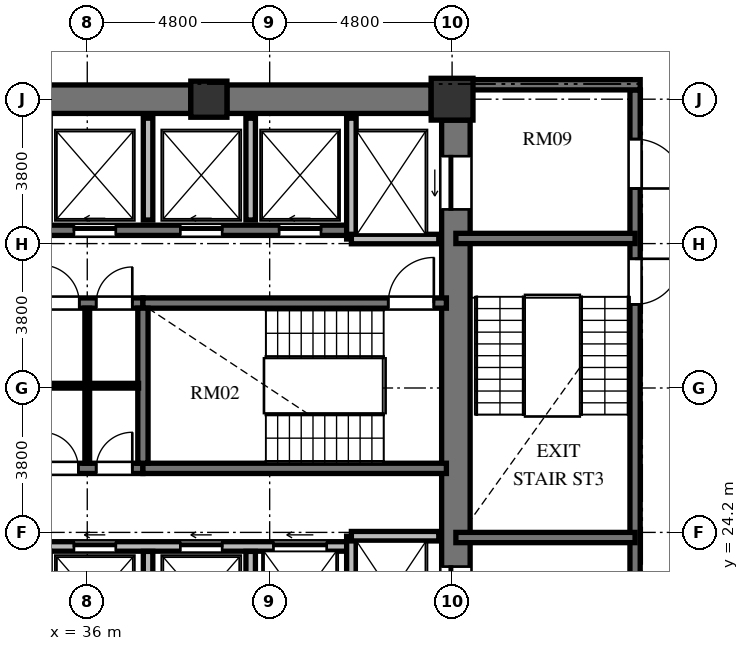
"""IFC4 building model, lengths in metres.
Left out: names, types, materials, properties, quantities, classifications, styles, units other than length and angle.
Written with IfcOpenShell. Run it as: python <this file> out.ifc"""

import sys

from ifc_helpers import new_model, si_unit, direction, frame, frame_2d, origin, origin_2d, place, context, subcontext, project, spatial, rectangle, extrude, element, fill, save


model = new_model("IFC4")
c1 = context("Model", 3, precision=1e-05, world=origin(), true_north=direction((0.0, 1.0)))
c2 = subcontext(c1, "Body", "Model", "MODEL_VIEW")
j1 = project(units=[si_unit("LENGTHUNIT", "METRE"), si_unit("PLANEANGLEUNIT", "RADIAN")], contexts=[c1])
p1 = place(None, origin())
s1 = spatial("IfcSite", under=j1, at=p1, CompositionType="ELEMENT")
p2 = place(p1, origin())
s2 = spatial("IfcBuilding", under=s1, at=p2, CompositionType="ELEMENT")
p3 = place(p2, frame((0.0, 0.0, 92.688)))
s3 = spatial("IfcBuildingStorey", under=s2, at=p3, CompositionType="ELEMENT", Elevation=92.688)
p4 = place(p3, frame((45.6, 35.6, 0.0), z_axis=(0.0, 0.0, 1.0), x_axis=(1.0, 0.0, 0.0)))
e1 = element("IfcColumn", 1, at=p4, inside=s3, PredefinedType="COLUMN", context=c2, shape_type="SweptSolid", body=[
    extrude(rectangle(XDim=1.1, YDim=1.1, at=origin_2d()), origin(), (0.0, 0.0, 1.0), 3.648),
])
p5 = place(p3, frame((39.2, 35.6, 0.0), z_axis=(0.0, 0.0, 1.0), x_axis=(1.0, 0.0, 0.0)))
e2 = element("IfcColumn", 2, at=p5, inside=s3, PredefinedType="COLUMN", context=c2, shape_type="SweptSolid", body=[
    extrude(rectangle(XDim=0.95, YDim=0.95, at=origin_2d()), origin(), (0.0, 0.0, 1.0), 3.648),
])
p6 = place(p3, frame((45.7, 20.95, 0.0), z_axis=(0.0, 0.0, 1.0), x_axis=(0.0, 1.0, 0.0)))
e3 = element("IfcWall", 3, at=p6, inside=s3, PredefinedType="SHEAR", context=c2, shape_type="SweptSolid", body=[
    extrude(rectangle(XDim=14.1, YDim=0.75, at=frame_2d((7.05, 0.0))), origin(), (0.0, 0.0, 1.0), 3.648),
])
p7 = place(p6, frame((11.75, 0.0, 0.0)))
e4 = element("IfcOpeningElement", 4, at=p7, cuts=e3, PredefinedType="OPENING", context=c2, shape_type="SweptSolid", body=[
    extrude(rectangle(XDim=1.4, YDim=2.3, at=frame_2d((0.7, 1.15))), frame((0.0, 0.385, 0.0), z_axis=(0.0, -1.0, 0.0), x_axis=(1.0, 0.0, 0.0)), (0.0, 0.0, 1.0), 0.77),
])
p8 = place(p6, frame((0.95, 0.0, 0.0)))
e5 = element("IfcOpeningElement", 5, at=p8, cuts=e3, PredefinedType="OPENING", context=c2, shape_type="SweptSolid", body=[
    extrude(rectangle(XDim=1.4, YDim=2.3, at=frame_2d((0.7, 1.15))), frame((0.0, 0.385, 0.0), z_axis=(0.0, -1.0, 0.0), x_axis=(1.0, 0.0, 0.0)), (0.0, 0.0, 1.0), 0.77),
])
p9 = place(p3, frame((33.275, 35.6, 0.0), z_axis=(0.0, 0.0, 1.0), x_axis=(1.0, 0.0, 0.0)))
e6 = element("IfcWall", 6, at=p9, inside=s3, PredefinedType="SHEAR", context=c2, shape_type="SweptSolid", body=[
    extrude(rectangle(XDim=5.45, YDim=0.75, at=frame_2d((2.725, 0.0))), origin(), (0.0, 0.0, 1.0), 3.648),
])
p10 = place(p3, frame((39.675, 35.6, 0.0), z_axis=(0.0, 0.0, 1.0), x_axis=(1.0, 0.0, 0.0)))
e7 = element("IfcWall", 7, at=p10, inside=s3, PredefinedType="SHEAR", context=c2, shape_type="SweptSolid", body=[
    extrude(rectangle(XDim=5.375, YDim=0.75, at=frame_2d((2.688, 0.0))), origin(), (0.0, 0.0, 1.0), 3.648),
])
p11 = place(p3, frame((34.535, 30.235, 0.0), z_axis=(0.0, 0.0, 1.0), x_axis=(1.0, 0.0, 0.0)))
e8 = element("IfcWall", 8, at=p11, inside=s3, PredefinedType="SHEAR", context=c2, shape_type="SweptSolid", body=[
    extrude(rectangle(XDim=2.93, YDim=0.27, at=frame_2d((1.465, 0.0))), origin(), (0.0, 0.0, 1.0), 3.648),
])
p12 = place(p11, frame((0.255, 0.0, 0.0)))
e9 = element("IfcOpeningElement", 9, at=p12, cuts=e8, PredefinedType="OPENING", context=c2, shape_type="SweptSolid", body=[
    extrude(rectangle(XDim=1.0, YDim=2.1, at=frame_2d((0.5, 1.05))), frame((0.0, 0.145, 0.0), z_axis=(0.0, -1.0, 0.0), x_axis=(1.0, 0.0, 0.0)), (0.0, 0.0, 1.0), 0.29),
])
p13 = place(p11, frame((1.7, 0.0, 0.0)))
e10 = element("IfcOpeningElement", 10, at=p13, cuts=e8, PredefinedType="OPENING", context=c2, shape_type="SweptSolid", body=[
    extrude(rectangle(XDim=0.95, YDim=2.1, at=frame_2d((0.475, 1.05))), frame((0.0, 0.145, 0.0), z_axis=(0.0, -1.0, 0.0), x_axis=(1.0, 0.0, 0.0)), (0.0, 0.0, 1.0), 0.29),
])
p14 = place(p3, frame((37.465, 30.235, 0.0), z_axis=(0.0, 0.0, 1.0), x_axis=(1.0, 0.0, 0.0)))
e11 = element("IfcWall", 11, at=p14, inside=s3, PredefinedType="SHEAR", context=c2, shape_type="SweptSolid", body=[
    extrude(rectangle(XDim=7.985, YDim=0.27, at=frame_2d((3.992, 0.0))), origin(), (0.0, 0.0, 1.0), 3.648),
])
p15 = place(p14, frame((6.455, 0.0, 0.0)))
e12 = element("IfcOpeningElement", 12, at=p15, cuts=e11, PredefinedType="OPENING", context=c2, shape_type="SweptSolid", body=[
    extrude(rectangle(XDim=1.2, YDim=2.15, at=frame_2d((0.6, 1.075))), frame((0.0, 0.145, 0.0), z_axis=(0.0, -1.0, 0.0), x_axis=(1.0, 0.0, 0.0)), (0.0, 0.0, 1.0), 0.29),
])
p16 = place(p3, frame((34.535, 25.885, 0.0), z_axis=(0.0, 0.0, 1.0), x_axis=(1.0, 0.0, 0.0)))
e13 = element("IfcWall", 13, at=p16, inside=s3, PredefinedType="SHEAR", context=c2, shape_type="SweptSolid", body=[
    extrude(rectangle(XDim=2.93, YDim=0.27, at=frame_2d((1.465, 0.0))), origin(), (0.0, 0.0, 1.0), 3.648),
])
p17 = place(p16, frame((0.28, 0.0, 0.0)))
e14 = element("IfcOpeningElement", 14, at=p17, cuts=e13, PredefinedType="OPENING", context=c2, shape_type="SweptSolid", body=[
    extrude(rectangle(XDim=0.95, YDim=2.1, at=frame_2d((0.475, 1.05))), frame((0.0, 0.145, 0.0), z_axis=(0.0, -1.0, 0.0), x_axis=(1.0, 0.0, 0.0)), (0.0, 0.0, 1.0), 0.29),
])
p18 = place(p16, frame((1.7, 0.0, 0.0)))
e15 = element("IfcOpeningElement", 15, at=p18, cuts=e13, PredefinedType="OPENING", context=c2, shape_type="SweptSolid", body=[
    extrude(rectangle(XDim=0.95, YDim=2.1, at=frame_2d((0.475, 1.05))), frame((0.0, 0.145, 0.0), z_axis=(0.0, -1.0, 0.0), x_axis=(1.0, 0.0, 0.0)), (0.0, 0.0, 1.0), 0.29),
])
p19 = place(p3, frame((37.465, 25.885, 0.0), z_axis=(0.0, 0.0, 1.0), x_axis=(1.0, 0.0, 0.0)))
e16 = element("IfcWall", 16, at=p19, inside=s3, PredefinedType="SHEAR", context=c2, shape_type="SweptSolid", body=[
    extrude(rectangle(XDim=7.985, YDim=0.27, at=frame_2d((3.992, 0.0))), origin(), (0.0, 0.0, 1.0), 3.648),
])
p20 = place(p3, frame((37.465, 26.02, 0.0), z_axis=(0.0, 0.0, 1.0), x_axis=(0.0, 1.0, 0.0)))
e17 = element("IfcWall", 17, at=p20, inside=s3, PredefinedType="SHEAR", context=c2, shape_type="SweptSolid", body=[
    extrude(rectangle(XDim=4.08, YDim=0.27, at=frame_2d((2.04, 0.0))), origin(), (0.0, 0.0, 1.0), 3.648),
])
p21 = place(p3, frame((34.65, 28.06, 0.0), z_axis=(0.0, 0.0, 1.0), x_axis=(1.0, 0.0, 0.0)))
e18 = element("IfcWall", 18, at=p21, inside=s3, PredefinedType="PARTITIONING", context=c2, shape_type="SweptSolid", body=[
    extrude(rectangle(XDim=2.7, YDim=0.125, at=frame_2d((1.35, 0.0))), origin(), (0.0, 0.0, 1.0), 3.428),
])
p22 = place(p3, frame((36.0, 26.02, 0.0), z_axis=(0.0, 0.0, 1.0), x_axis=(0.0, 1.0, 0.0)))
e19 = element("IfcWall", 19, at=p22, inside=s3, PredefinedType="PARTITIONING", context=c2, shape_type="SweptSolid", body=[
    extrude(rectangle(XDim=4.08, YDim=0.125, at=frame_2d((2.04, 0.0))), origin(), (0.0, 0.0, 1.0), 3.428),
])
p23 = place(p3, frame((26.55, 32.15, 0.0), z_axis=(0.0, 0.0, 1.0), x_axis=(1.0, 0.0, 0.0)))
e20 = element("IfcWall", 20, at=p23, inside=s3, PredefinedType="SHEAR", context=c2, shape_type="SweptSolid", body=[
    extrude(rectangle(XDim=16.4, YDim=0.27, at=frame_2d((8.2, 0.0))), origin(), (0.0, 0.0, 1.0), 3.648),
])
p24 = place(p23, frame((1.1, 0.0, 0.0)))
e21 = element("IfcOpeningElement", 21, at=p24, cuts=e20, PredefinedType="OPENING", context=c2, shape_type="SweptSolid", body=[
    extrude(rectangle(XDim=1.1, YDim=2.2, at=frame_2d((0.55, 1.1))), frame((0.0, 0.145, 0.0), z_axis=(0.0, -1.0, 0.0), x_axis=(1.0, 0.0, 0.0)), (0.0, 0.0, 1.0), 0.29),
])
p25 = place(p23, frame((3.7, 0.0, 0.0)))
e22 = element("IfcOpeningElement", 22, at=p25, cuts=e20, PredefinedType="OPENING", context=c2, shape_type="SweptSolid", body=[
    extrude(rectangle(XDim=1.1, YDim=2.2, at=frame_2d((0.55, 1.1))), frame((0.0, 0.145, 0.0), z_axis=(0.0, -1.0, 0.0), x_axis=(1.0, 0.0, 0.0)), (0.0, 0.0, 1.0), 0.29),
])
p26 = place(p23, frame((6.5, 0.0, 0.0)))
e23 = element("IfcOpeningElement", 23, at=p26, cuts=e20, PredefinedType="OPENING", context=c2, shape_type="SweptSolid", body=[
    extrude(rectangle(XDim=1.1, YDim=2.2, at=frame_2d((0.55, 1.1))), frame((0.0, 0.145, 0.0), z_axis=(0.0, -1.0, 0.0), x_axis=(1.0, 0.0, 0.0)), (0.0, 0.0, 1.0), 0.29),
])
p27 = place(p23, frame((9.1, 0.0, 0.0)))
e24 = element("IfcOpeningElement", 24, at=p27, cuts=e20, PredefinedType="OPENING", context=c2, shape_type="SweptSolid", body=[
    extrude(rectangle(XDim=1.1, YDim=2.2, at=frame_2d((0.55, 1.1))), frame((0.0, 0.145, 0.0), z_axis=(0.0, -1.0, 0.0), x_axis=(1.0, 0.0, 0.0)), (0.0, 0.0, 1.0), 0.29),
])
p28 = place(p23, frame((11.9, 0.0, 0.0)))
e25 = element("IfcOpeningElement", 25, at=p28, cuts=e20, PredefinedType="OPENING", context=c2, shape_type="SweptSolid", body=[
    extrude(rectangle(XDim=1.1, YDim=2.2, at=frame_2d((0.55, 1.1))), frame((0.0, 0.145, 0.0), z_axis=(0.0, -1.0, 0.0), x_axis=(1.0, 0.0, 0.0)), (0.0, 0.0, 1.0), 0.29),
])
p29 = place(p23, frame((14.5, 0.0, 0.0)))
e26 = element("IfcOpeningElement", 26, at=p29, cuts=e20, PredefinedType="OPENING", context=c2, shape_type="SweptSolid", body=[
    extrude(rectangle(XDim=1.1, YDim=2.2, at=frame_2d((0.55, 1.1))), frame((0.0, 0.145, 0.0), z_axis=(0.0, -1.0, 0.0), x_axis=(1.0, 0.0, 0.0)), (0.0, 0.0, 1.0), 0.29),
])
p30 = place(p3, frame((26.75, 23.83, 0.0), z_axis=(0.0, 0.0, 1.0), x_axis=(1.0, 0.0, 0.0)))
e27 = element("IfcWall", 27, at=p30, inside=s3, PredefinedType="SOLIDWALL", context=c2, shape_type="SweptSolid", body=[
    extrude(rectangle(XDim=16.2, YDim=0.25, at=frame_2d((8.1, 0.0))), origin(), (0.0, 0.0, 1.0), 3.428),
])
p31 = place(p30, frame((0.9, 0.0, 0.0)))
e28 = element("IfcOpeningElement", 28, at=p31, cuts=e27, PredefinedType="OPENING", context=c2, shape_type="SweptSolid", body=[
    extrude(rectangle(XDim=1.1, YDim=2.2, at=frame_2d((0.55, 1.1))), frame((0.0, 0.135, 0.0), z_axis=(0.0, -1.0, 0.0), x_axis=(1.0, 0.0, 0.0)), (0.0, 0.0, 1.0), 0.27),
])
p32 = place(p30, frame((3.5, 0.0, 0.0)))
e29 = element("IfcOpeningElement", 29, at=p32, cuts=e27, PredefinedType="OPENING", context=c2, shape_type="SweptSolid", body=[
    extrude(rectangle(XDim=1.1, YDim=2.2, at=frame_2d((0.55, 1.1))), frame((0.0, 0.135, 0.0), z_axis=(0.0, -1.0, 0.0), x_axis=(1.0, 0.0, 0.0)), (0.0, 0.0, 1.0), 0.27),
])
p33 = place(p30, frame((6.3, 0.0, 0.0)))
e30 = element("IfcOpeningElement", 30, at=p33, cuts=e27, PredefinedType="OPENING", context=c2, shape_type="SweptSolid", body=[
    extrude(rectangle(XDim=1.1, YDim=2.2, at=frame_2d((0.55, 1.1))), frame((0.0, 0.135, 0.0), z_axis=(0.0, -1.0, 0.0), x_axis=(1.0, 0.0, 0.0)), (0.0, 0.0, 1.0), 0.27),
])
p34 = place(p30, frame((8.9, 0.0, 0.0)))
e31 = element("IfcOpeningElement", 31, at=p34, cuts=e27, PredefinedType="OPENING", context=c2, shape_type="SweptSolid", body=[
    extrude(rectangle(XDim=1.1, YDim=2.2, at=frame_2d((0.55, 1.1))), frame((0.0, 0.135, 0.0), z_axis=(0.0, -1.0, 0.0), x_axis=(1.0, 0.0, 0.0)), (0.0, 0.0, 1.0), 0.27),
])
p35 = place(p30, frame((11.7, 0.0, 0.0)))
e32 = element("IfcOpeningElement", 32, at=p35, cuts=e27, PredefinedType="OPENING", context=c2, shape_type="SweptSolid", body=[
    extrude(rectangle(XDim=1.1, YDim=2.2, at=frame_2d((0.55, 1.1))), frame((0.0, 0.135, 0.0), z_axis=(0.0, -1.0, 0.0), x_axis=(1.0, 0.0, 0.0)), (0.0, 0.0, 1.0), 0.27),
])
p36 = place(p30, frame((14.15, 0.0, 0.0)))
e33 = element("IfcOpeningElement", 33, at=p36, cuts=e27, PredefinedType="OPENING", context=c2, shape_type="SweptSolid", body=[
    extrude(rectangle(XDim=1.4, YDim=2.3, at=frame_2d((0.7, 1.15))), frame((0.0, 0.135, 0.0), z_axis=(0.0, -1.0, 0.0), x_axis=(1.0, 0.0, 0.0)), (0.0, 0.0, 1.0), 0.27),
])
p37 = place(p3, frame((42.95, 31.92, 0.0), z_axis=(0.0, 0.0, 1.0), x_axis=(0.0, 1.0, 0.0)))
e34 = element("IfcWall", 34, at=p37, inside=s3, PredefinedType="SOLIDWALL", context=c2, shape_type="SweptSolid", body=[
    extrude(rectangle(XDim=3.18, YDim=0.25, at=frame_2d((1.59, 0.0))), origin(), (0.0, 0.0, 1.0), 3.428),
])
p38 = place(p3, frame((42.95, 31.92, 0.0), z_axis=(0.0, 0.0, 1.0), x_axis=(1.0, 0.0, 0.0)))
e35 = element("IfcWall", 35, at=p38, inside=s3, PredefinedType="SOLIDWALL", context=c2, shape_type="SweptSolid", body=[
    extrude(rectangle(XDim=2.3, YDim=0.25, at=frame_2d((1.15, 0.0))), origin(), (0.0, 0.0, 1.0), 3.428),
])
p39 = place(p3, frame((42.95, 20.9, 0.0), z_axis=(0.0, 0.0, 1.0), x_axis=(0.0, 1.0, 0.0)))
e36 = element("IfcWall", 36, at=p39, inside=s3, PredefinedType="SOLIDWALL", context=c2, shape_type="SweptSolid", body=[
    extrude(rectangle(XDim=3.2, YDim=0.25, at=frame_2d((1.6, 0.0))), origin(), (0.0, 0.0, 1.0), 3.428),
])
p40 = place(p3, frame((42.95, 24.1, 0.0), z_axis=(0.0, 0.0, 1.0), x_axis=(1.0, 0.0, 0.0)))
e37 = element("IfcWall", 37, at=p40, inside=s3, PredefinedType="SOLIDWALL", context=c2, shape_type="SweptSolid", body=[
    extrude(rectangle(XDim=2.3, YDim=0.25, at=frame_2d((1.15, 0.0))), origin(), (0.0, 0.0, 1.0), 3.428),
])
p41 = place(p3, frame((37.6, 32.42, 0.0), z_axis=(0.0, 0.0, 1.0), x_axis=(0.0, 1.0, 0.0)))
e38 = element("IfcWall", 38, at=p41, inside=s3, PredefinedType="SOLIDWALL", context=c2, shape_type="SweptSolid", body=[
    extrude(rectangle(XDim=2.68, YDim=0.25, at=frame_2d((1.34, 0.0))), origin(), (0.0, 0.0, 1.0), 3.428),
])
p42 = place(p3, frame((37.6, 20.9, 0.0), z_axis=(0.0, 0.0, 1.0), x_axis=(0.0, 1.0, 0.0)))
e39 = element("IfcWall", 39, at=p42, inside=s3, PredefinedType="SOLIDWALL", context=c2, shape_type="SweptSolid", body=[
    extrude(rectangle(XDim=2.8, YDim=0.25, at=frame_2d((1.4, 0.0))), origin(), (0.0, 0.0, 1.0), 3.428),
])
p43 = place(p3, frame((40.3, 32.42, 0.0), z_axis=(0.0, 0.0, 1.0), x_axis=(0.0, 1.0, 0.0)))
e40 = element("IfcWall", 40, at=p43, inside=s3, PredefinedType="SOLIDWALL", context=c2, shape_type="SweptSolid", body=[
    extrude(rectangle(XDim=2.68, YDim=0.25, at=frame_2d((1.34, 0.0))), origin(), (0.0, 0.0, 1.0), 3.428),
])
p44 = place(p3, frame((40.3, 20.9, 0.0), z_axis=(0.0, 0.0, 1.0), x_axis=(0.0, 1.0, 0.0)))
e41 = element("IfcWall", 41, at=p44, inside=s3, PredefinedType="SOLIDWALL", context=c2, shape_type="SweptSolid", body=[
    extrude(rectangle(XDim=2.8, YDim=0.25, at=frame_2d((1.4, 0.0))), origin(), (0.0, 0.0, 1.0), 3.428),
])
p45 = place(p3, frame((50.415, 35.845, 0.0), z_axis=(0.0, 0.0, 1.0), x_axis=(0.0, -1.0, 0.0)))
e42 = element("IfcWall", 42, at=p45, inside=s3, PredefinedType="SHEAR", context=c2, shape_type="SweptSolid", body=[
    extrude(rectangle(XDim=15.825, YDim=0.27, at=frame_2d((7.913, 0.0))), origin(), (0.0, 0.0, 1.0), 3.648),
])
p46 = place(p45, frame((4.445, 0.0, 0.0)))
e43 = element("IfcOpeningElement", 43, at=p46, cuts=e42, PredefinedType="OPENING", context=c2, shape_type="SweptSolid", body=[
    extrude(rectangle(XDim=1.2, YDim=2.15, at=frame_2d((0.6, 1.075))), frame((0.0, 0.145, 0.0), z_axis=(0.0, -1.0, 0.0), x_axis=(1.0, 0.0, 0.0)), (0.0, 0.0, 1.0), 0.29),
])
p47 = place(p45, frame((1.295, 0.0, 0.0)))
e44 = element("IfcOpeningElement", 44, at=p47, cuts=e42, PredefinedType="OPENING", context=c2, shape_type="SweptSolid", body=[
    extrude(rectangle(XDim=1.3, YDim=2.2, at=frame_2d((0.65, 1.1))), frame((0.0, 0.145, 0.0), z_axis=(0.0, -1.0, 0.0), x_axis=(1.0, 0.0, 0.0)), (0.0, 0.0, 1.0), 0.29),
])
p48 = place(p45, frame((13.095, 0.0, 0.0)))
e45 = element("IfcOpeningElement", 45, at=p48, cuts=e42, PredefinedType="OPENING", context=c2, shape_type="SweptSolid", body=[
    extrude(rectangle(XDim=1.3, YDim=2.2, at=frame_2d((0.65, 1.1))), frame((0.0, 0.145, 0.0), z_axis=(0.0, -1.0, 0.0), x_axis=(1.0, 0.0, 0.0)), (0.0, 0.0, 1.0), 0.29),
])
p49 = place(p3, frame((46.075, 35.98, 0.0), z_axis=(0.0, 0.0, 1.0), x_axis=(1.0, 0.0, 0.0)))
e46 = element("IfcWall", 46, at=p49, inside=s3, PredefinedType="SHEAR", context=c2, shape_type="SweptSolid", body=[
    extrude(rectangle(XDim=4.475, YDim=0.27, at=frame_2d((2.238, 0.0))), origin(), (0.0, 0.0, 1.0), 3.648),
])
for number, where, z_axis, x_axis in (
    (47, (45.7, 31.935, 0.0), (0.0, 0.0, 1.0), (1.0, 0.0, 0.0)),
    (48, (45.7, 24.065, 0.0), (0.0, 0.0, 1.0), (1.0, 0.0, 0.0)),
):
    element("IfcWall", number, at=place(p3, frame(where, z_axis=z_axis, x_axis=x_axis)), inside=s3, PredefinedType="SHEAR", context=c2, shape_type="SweptSolid", body=[
        extrude(rectangle(XDim=4.715, YDim=0.27, at=frame_2d((2.357, 0.0))), origin(), (0.0, 0.0, 1.0), 3.648),
    ])
p50 = place(p15, origin())
e49 = element("IfcDoor", 49, at=p50, inside=s3, OperationType="SINGLE_SWING_RIGHT", PredefinedType="DOOR", context=c2, shape_type="SweptSolid", body=[
    extrude(rectangle(XDim=1.2, YDim=2.15, at=frame_2d((0.6, 1.075))), frame((0.0, 0.025, 0.0), z_axis=(0.0, -1.0, 0.0), x_axis=(1.0, 0.0, 0.0)), (0.0, 0.0, 1.0), 0.05),
])
fill(e12, e49)
p51 = place(p17, origin())
e50 = element("IfcDoor", 50, at=p51, inside=s3, OperationType="SINGLE_SWING_LEFT", PredefinedType="DOOR", context=c2, shape_type="SweptSolid", body=[
    extrude(rectangle(XDim=0.95, YDim=2.1, at=frame_2d((0.475, 1.05))), frame((0.0, 0.025, 0.0), z_axis=(0.0, -1.0, 0.0), x_axis=(1.0, 0.0, 0.0)), (0.0, 0.0, 1.0), 0.05),
])
fill(e14, e50)
p52 = place(p18, origin())
e51 = element("IfcDoor", 51, at=p52, inside=s3, OperationType="SINGLE_SWING_RIGHT", PredefinedType="DOOR", context=c2, shape_type="SweptSolid", body=[
    extrude(rectangle(XDim=0.95, YDim=2.1, at=frame_2d((0.475, 1.05))), frame((0.0, 0.025, 0.0), z_axis=(0.0, -1.0, 0.0), x_axis=(1.0, 0.0, 0.0)), (0.0, 0.0, 1.0), 0.05),
])
fill(e15, e51)
p53 = place(p12, origin())
e52 = element("IfcDoor", 52, at=p53, inside=s3, OperationType="SINGLE_SWING_LEFT", PredefinedType="DOOR", context=c2, shape_type="SweptSolid", body=[
    extrude(rectangle(XDim=1.0, YDim=2.1, at=frame_2d((0.5, 1.05))), frame((0.0, 0.025, 0.0), z_axis=(0.0, -1.0, 0.0), x_axis=(1.0, 0.0, 0.0)), (0.0, 0.0, 1.0), 0.05),
])
fill(e9, e52)
p54 = place(p13, origin())
e53 = element("IfcDoor", 53, at=p54, inside=s3, OperationType="SINGLE_SWING_RIGHT", PredefinedType="DOOR", context=c2, shape_type="SweptSolid", body=[
    extrude(rectangle(XDim=0.95, YDim=2.1, at=frame_2d((0.475, 1.05))), frame((0.0, 0.025, 0.0), z_axis=(0.0, -1.0, 0.0), x_axis=(1.0, 0.0, 0.0)), (0.0, 0.0, 1.0), 0.05),
])
fill(e10, e53)
p55 = place(p27, origin())
e54 = element("IfcDoor", 54, at=p55, inside=s3, OperationType="SLIDING_TO_LEFT", PredefinedType="DOOR", context=c2, shape_type="SweptSolid", body=[
    extrude(rectangle(XDim=1.1, YDim=2.2, at=frame_2d((0.55, 1.1))), frame((0.0, 0.025, 0.0), z_axis=(0.0, -1.0, 0.0), x_axis=(1.0, 0.0, 0.0)), (0.0, 0.0, 1.0), 0.05),
])
fill(e24, e54)
p56 = place(p34, origin())
e55 = element("IfcDoor", 55, at=p56, inside=s3, OperationType="SLIDING_TO_LEFT", PredefinedType="DOOR", context=c2, shape_type="SweptSolid", body=[
    extrude(rectangle(XDim=1.1, YDim=2.2, at=frame_2d((0.55, 1.1))), frame((0.0, 0.025, 0.0), z_axis=(0.0, -1.0, 0.0), x_axis=(1.0, 0.0, 0.0)), (0.0, 0.0, 1.0), 0.05),
])
fill(e31, e55)
p57 = place(p28, origin())
e56 = element("IfcDoor", 56, at=p57, inside=s3, OperationType="SLIDING_TO_LEFT", PredefinedType="DOOR", context=c2, shape_type="SweptSolid", body=[
    extrude(rectangle(XDim=1.1, YDim=2.2, at=frame_2d((0.55, 1.1))), frame((0.0, 0.025, 0.0), z_axis=(0.0, -1.0, 0.0), x_axis=(1.0, 0.0, 0.0)), (0.0, 0.0, 1.0), 0.05),
])
fill(e25, e56)
p58 = place(p29, origin())
e57 = element("IfcDoor", 57, at=p58, inside=s3, OperationType="SLIDING_TO_LEFT", PredefinedType="DOOR", context=c2, shape_type="SweptSolid", body=[
    extrude(rectangle(XDim=1.1, YDim=2.2, at=frame_2d((0.55, 1.1))), frame((0.0, 0.025, 0.0), z_axis=(0.0, -1.0, 0.0), x_axis=(1.0, 0.0, 0.0)), (0.0, 0.0, 1.0), 0.05),
])
fill(e26, e57)
p59 = place(p35, origin())
e58 = element("IfcDoor", 58, at=p59, inside=s3, OperationType="SLIDING_TO_LEFT", PredefinedType="DOOR", context=c2, shape_type="SweptSolid", body=[
    extrude(rectangle(XDim=1.1, YDim=2.2, at=frame_2d((0.55, 1.1))), frame((0.0, 0.025, 0.0), z_axis=(0.0, -1.0, 0.0), x_axis=(1.0, 0.0, 0.0)), (0.0, 0.0, 1.0), 0.05),
])
fill(e32, e58)
p60 = place(p7, origin())
e59 = element("IfcDoor", 59, at=p60, inside=s3, OperationType="SLIDING_TO_LEFT", PredefinedType="DOOR", context=c2, shape_type="SweptSolid", body=[
    extrude(rectangle(XDim=1.4, YDim=2.3, at=frame_2d((0.7, 1.15))), frame((0.0, 0.025, 0.0), z_axis=(0.0, -1.0, 0.0), x_axis=(1.0, 0.0, 0.0)), (0.0, 0.0, 1.0), 0.05),
])
fill(e4, e59)
p61 = place(p8, origin())
e60 = element("IfcDoor", 60, at=p61, inside=s3, OperationType="SLIDING_TO_LEFT", PredefinedType="DOOR", context=c2, shape_type="SweptSolid", body=[
    extrude(rectangle(XDim=1.4, YDim=2.3, at=frame_2d((0.7, 1.15))), frame((0.0, 0.025, 0.0), z_axis=(0.0, -1.0, 0.0), x_axis=(1.0, 0.0, 0.0)), (0.0, 0.0, 1.0), 0.05),
])
fill(e5, e60)
p62 = place(p36, origin())
e61 = element("IfcDoor", 61, at=p62, inside=s3, OperationType="SLIDING_TO_LEFT", PredefinedType="DOOR", context=c2, shape_type="SweptSolid", body=[
    extrude(rectangle(XDim=1.4, YDim=2.3, at=frame_2d((0.7, 1.15))), frame((0.0, 0.025, 0.0), z_axis=(0.0, -1.0, 0.0), x_axis=(1.0, 0.0, 0.0)), (0.0, 0.0, 1.0), 0.05),
])
fill(e33, e61)
p63 = place(p46, origin())
e62 = element("IfcDoor", 62, at=p63, inside=s3, OperationType="SINGLE_SWING_LEFT", PredefinedType="DOOR", context=c2, shape_type="SweptSolid", body=[
    extrude(rectangle(XDim=1.2, YDim=2.15, at=frame_2d((0.6, 1.075))), frame((0.0, 0.025, 0.0), z_axis=(0.0, -1.0, 0.0), x_axis=(1.0, 0.0, 0.0)), (0.0, 0.0, 1.0), 0.05),
])
fill(e43, e62)
p64 = place(p47, origin())
e63 = element("IfcDoor", 63, at=p64, inside=s3, OperationType="SINGLE_SWING_RIGHT", PredefinedType="DOOR", context=c2, shape_type="SweptSolid", body=[
    extrude(rectangle(XDim=1.3, YDim=2.2, at=frame_2d((0.65, 1.1))), frame((0.0, 0.025, 0.0), z_axis=(0.0, -1.0, 0.0), x_axis=(1.0, 0.0, 0.0)), (0.0, 0.0, 1.0), 0.05),
])
fill(e44, e63)
save(model, sys.argv[1])
